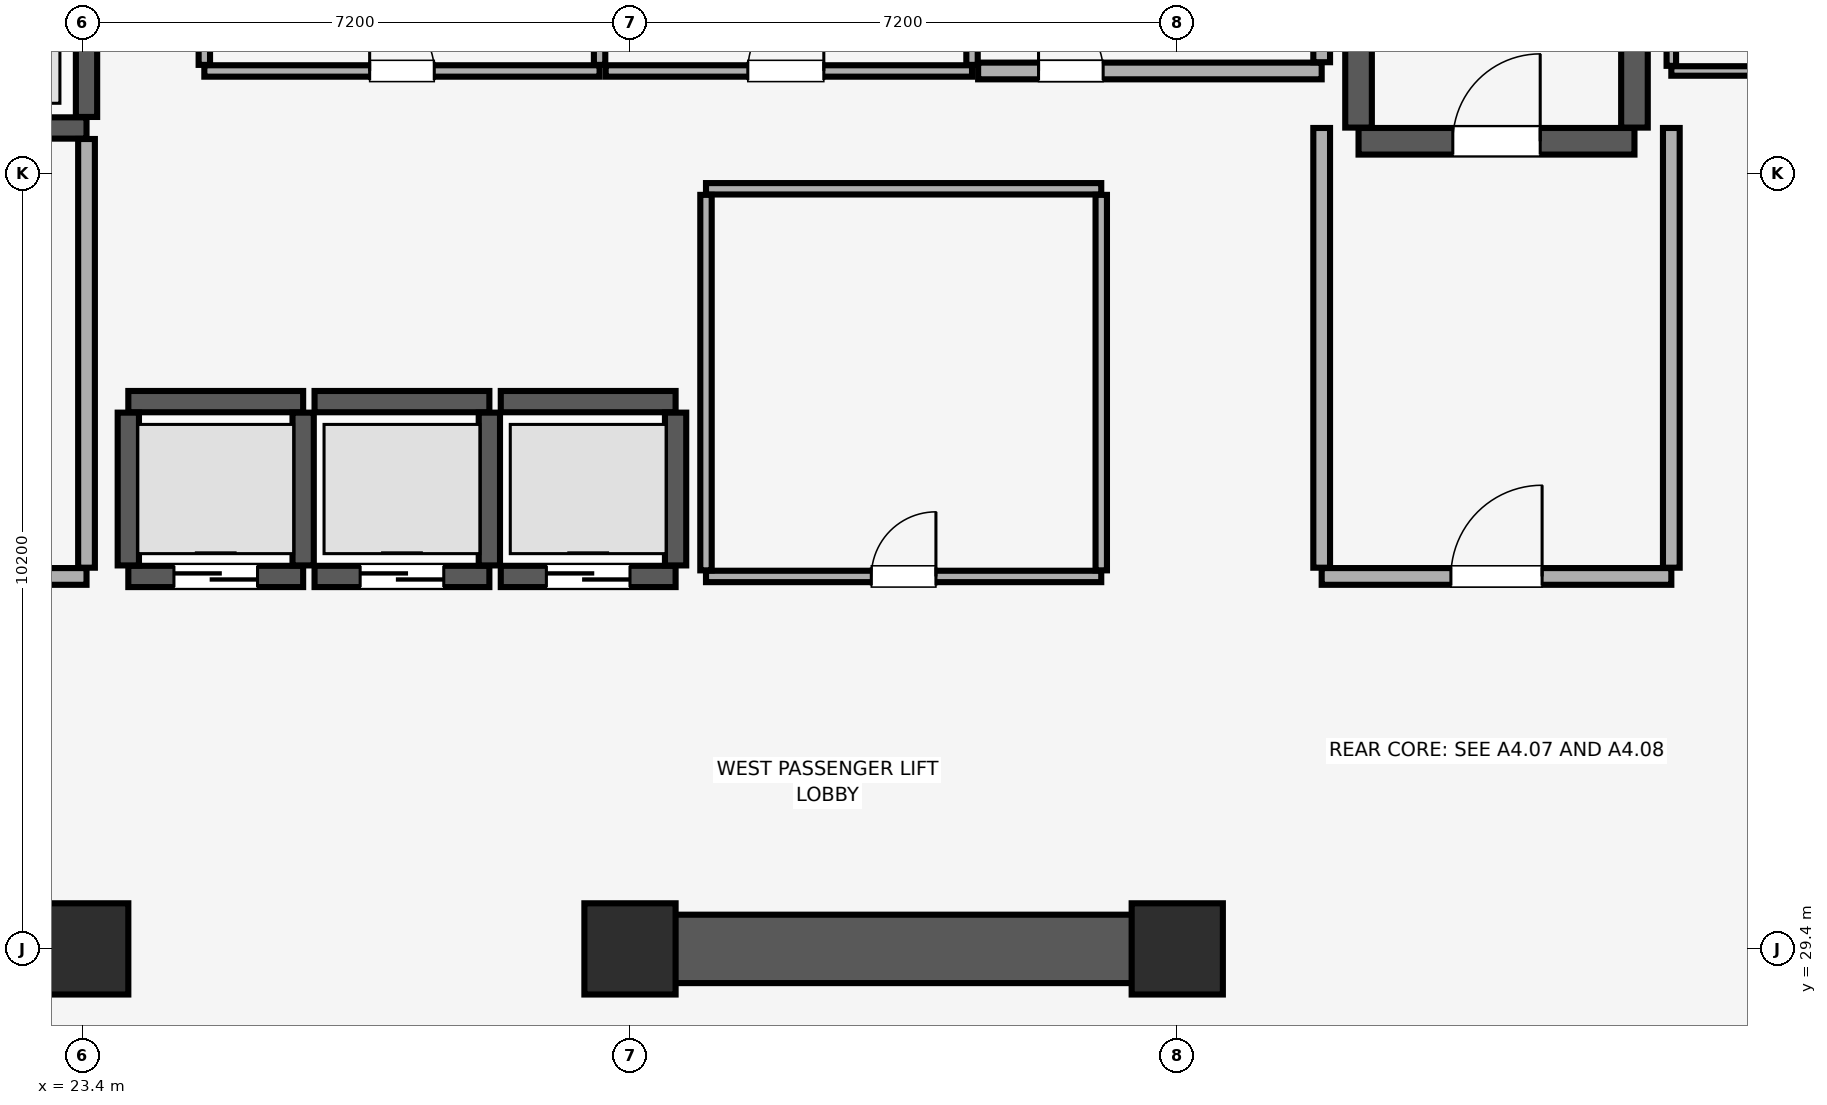
"""IFC4 building model, lengths in metres.
Left out: names, types, materials, properties, quantities, classifications, styles, units other than length and angle.
Written with IfcOpenShell. Run it as: python <this file> out.ifc"""

import sys

from ifc_helpers import new_model, si_unit, direction, frame, frame_2d, origin, origin_2d, place, context, subcontext, project, spatial, rectangle, extrude, element, fill, save


model = new_model("IFC4")
c1 = context("Model", 3, precision=1e-05, world=origin(), true_north=direction((0.0, 1.0)))
c2 = subcontext(c1, "Body", "Model", "MODEL_VIEW")
j1 = project(units=[si_unit("LENGTHUNIT", "METRE"), si_unit("PLANEANGLEUNIT", "RADIAN")], contexts=[c1])
p1 = place(None, origin())
s1 = spatial("IfcSite", under=j1, at=p1, CompositionType="ELEMENT")
p2 = place(p1, origin())
s2 = spatial("IfcBuilding", under=s1, at=p2, CompositionType="ELEMENT")
p3 = place(p2, frame((0.0, 0.0, 130.55)))
s3 = spatial("IfcBuildingStorey", under=s2, at=p3, CompositionType="ELEMENT", Elevation=130.55)
for number, where, z_axis, x_axis in (
    (1, (23.4, 29.4, 0.0), (0.0, 0.0, 1.0), (1.0, 0.0, 0.0)),
    (2, (30.6, 29.4, 0.0), (0.0, 0.0, 1.0), (1.0, 0.0, 0.0)),
    (3, (37.8, 29.4, 0.0), (0.0, 0.0, 1.0), (1.0, 0.0, 0.0)),
):
    element("IfcColumn", number, at=place(p3, frame(where, z_axis=z_axis, x_axis=x_axis)), inside=s3, PredefinedType="COLUMN", context=c2, shape_type="SweptSolid", body=[
        extrude(rectangle(XDim=1.2, YDim=1.2, at=origin_2d()), origin(), (0.0, 0.0, 1.0), 4.56),
    ])
p4 = place(p3, frame((16.655, 29.4, 0.0), z_axis=(0.0, 0.0, 1.0), x_axis=(1.0, 0.0, 0.0)))
e4 = element("IfcWall", 4, at=p4, inside=s3, PredefinedType="SHEAR", context=c2, shape_type="SweptSolid", body=[
    extrude(rectangle(XDim=6.945, YDim=0.9, at=frame_2d((3.473, 0.0))), origin(), (0.0, 0.0, 1.0), 4.52),
])
p5 = place(p3, frame((30.4, 29.4, 0.0), z_axis=(0.0, 0.0, 1.0), x_axis=(1.0, 0.0, 0.0)))
e5 = element("IfcWall", 5, at=p5, inside=s3, PredefinedType="SHEAR", context=c2, shape_type="SweptSolid", body=[
    extrude(rectangle(XDim=7.6, YDim=0.9, at=frame_2d((3.8, 0.0))), origin(), (0.0, 0.0, 1.0), 4.52),
])
p6 = place(p3, frame((40.185, 40.025, 0.0), z_axis=(0.0, 0.0, 1.0), x_axis=(1.0, 0.0, 0.0)))
e6 = element("IfcWall", 6, at=p6, inside=s3, PredefinedType="SHEAR", context=c2, shape_type="SweptSolid", body=[
    extrude(rectangle(XDim=3.63, YDim=0.35, at=frame_2d((1.815, 0.0))), origin(), (0.0, 0.0, 1.0), 4.52),
])
p7 = place(p6, frame((1.24, 0.0, 0.0)))
e7 = element("IfcOpeningElement", 7, at=p7, cuts=e6, PredefinedType="OPENING", context=c2, shape_type="SweptSolid", body=[
    extrude(rectangle(XDim=1.15, YDim=2.15, at=frame_2d((0.575, 1.075))), frame((0.0, 0.185, 0.0), z_axis=(0.0, -1.0, 0.0), x_axis=(1.0, 0.0, 0.0)), (0.0, 0.0, 1.0), 0.37),
])
for number, where, z_axis, x_axis in (
    (8, (40.185, 40.205, 0.0), (0.0, 0.0, 1.0), (0.0, 1.0, 0.0)),
    (9, (43.815, 40.205, 0.0), (0.0, 0.0, 1.0), (0.0, 1.0, 0.0)),
):
    element("IfcWall", number, at=place(p3, frame(where, z_axis=z_axis, x_axis=x_axis)), inside=s3, PredefinedType="SHEAR", context=c2, shape_type="SweptSolid", body=[
        extrude(rectangle(XDim=8.09, YDim=0.35, at=frame_2d((4.045, 0.0))), origin(), (0.0, 0.0, 1.0), 4.52),
    ])
p8 = place(p3, frame((24.0, 34.3, 0.0), z_axis=(0.0, 0.0, 1.0), x_axis=(1.0, 0.0, 0.0)))
e10 = element("IfcWall", 10, at=p8, inside=s3, PredefinedType="SHEAR", context=c2, shape_type="SweptSolid", body=[
    extrude(rectangle(XDim=2.3, YDim=0.28, at=frame_2d((1.15, 0.0))), origin(), (0.0, 0.0, 1.0), 4.52),
])
p9 = place(p8, frame((0.6, 0.0, 0.0)))
e11 = element("IfcOpeningElement", 11, at=p9, cuts=e10, PredefinedType="OPENING", context=c2, shape_type="SweptSolid", body=[
    extrude(rectangle(XDim=1.1, YDim=2.2, at=frame_2d((0.55, 1.1))), frame((0.0, 0.15, 0.0), z_axis=(0.0, -1.0, 0.0), x_axis=(1.0, 0.0, 0.0)), (0.0, 0.0, 1.0), 0.3),
])
p10 = place(p3, frame((24.0, 36.6, 0.0), z_axis=(0.0, 0.0, 1.0), x_axis=(1.0, 0.0, 0.0)))
e12 = element("IfcWall", 12, at=p10, inside=s3, PredefinedType="SHEAR", context=c2, shape_type="SweptSolid", body=[
    extrude(rectangle(XDim=2.3, YDim=0.28, at=frame_2d((1.15, 0.0))), origin(), (0.0, 0.0, 1.0), 4.52),
])
for number, where, z_axis, x_axis in (
    (13, (24.0, 34.445, 0.0), (0.0, 0.0, 1.0), (0.0, 1.0, 0.0)),
    (14, (26.3, 34.445, 0.0), (0.0, 0.0, 1.0), (0.0, 1.0, 0.0)),
):
    element("IfcWall", number, at=place(p3, frame(where, z_axis=z_axis, x_axis=x_axis)), inside=s3, PredefinedType="SHEAR", context=c2, shape_type="SweptSolid", body=[
        extrude(rectangle(XDim=2.01, YDim=0.28, at=frame_2d((1.005, 0.0))), origin(), (0.0, 0.0, 1.0), 4.52),
    ])
p11 = place(p3, frame((26.45, 34.3, 0.0), z_axis=(0.0, 0.0, 1.0), x_axis=(1.0, 0.0, 0.0)))
e15 = element("IfcWall", 15, at=p11, inside=s3, PredefinedType="SHEAR", context=c2, shape_type="SweptSolid", body=[
    extrude(rectangle(XDim=2.3, YDim=0.28, at=frame_2d((1.15, 0.0))), origin(), (0.0, 0.0, 1.0), 4.52),
])
p12 = place(p11, frame((0.6, 0.0, 0.0)))
e16 = element("IfcOpeningElement", 16, at=p12, cuts=e15, PredefinedType="OPENING", context=c2, shape_type="SweptSolid", body=[
    extrude(rectangle(XDim=1.1, YDim=2.2, at=frame_2d((0.55, 1.1))), frame((0.0, 0.15, 0.0), z_axis=(0.0, -1.0, 0.0), x_axis=(1.0, 0.0, 0.0)), (0.0, 0.0, 1.0), 0.3),
])
p13 = place(p3, frame((26.45, 36.6, 0.0), z_axis=(0.0, 0.0, 1.0), x_axis=(1.0, 0.0, 0.0)))
e17 = element("IfcWall", 17, at=p13, inside=s3, PredefinedType="SHEAR", context=c2, shape_type="SweptSolid", body=[
    extrude(rectangle(XDim=2.3, YDim=0.28, at=frame_2d((1.15, 0.0))), origin(), (0.0, 0.0, 1.0), 4.52),
])
p14 = place(p3, frame((28.75, 34.445, 0.0), z_axis=(0.0, 0.0, 1.0), x_axis=(0.0, 1.0, 0.0)))
e18 = element("IfcWall", 18, at=p14, inside=s3, PredefinedType="SHEAR", context=c2, shape_type="SweptSolid", body=[
    extrude(rectangle(XDim=2.01, YDim=0.28, at=frame_2d((1.005, 0.0))), origin(), (0.0, 0.0, 1.0), 4.52),
])
p15 = place(p3, frame((28.9, 34.3, 0.0), z_axis=(0.0, 0.0, 1.0), x_axis=(1.0, 0.0, 0.0)))
e19 = element("IfcWall", 19, at=p15, inside=s3, PredefinedType="SHEAR", context=c2, shape_type="SweptSolid", body=[
    extrude(rectangle(XDim=2.3, YDim=0.28, at=frame_2d((1.15, 0.0))), origin(), (0.0, 0.0, 1.0), 4.52),
])
p16 = place(p15, frame((0.6, 0.0, 0.0)))
e20 = element("IfcOpeningElement", 20, at=p16, cuts=e19, PredefinedType="OPENING", context=c2, shape_type="SweptSolid", body=[
    extrude(rectangle(XDim=1.1, YDim=2.2, at=frame_2d((0.55, 1.1))), frame((0.0, 0.15, 0.0), z_axis=(0.0, -1.0, 0.0), x_axis=(1.0, 0.0, 0.0)), (0.0, 0.0, 1.0), 0.3),
])
p17 = place(p3, frame((28.9, 36.6, 0.0), z_axis=(0.0, 0.0, 1.0), x_axis=(1.0, 0.0, 0.0)))
e21 = element("IfcWall", 21, at=p17, inside=s3, PredefinedType="SHEAR", context=c2, shape_type="SweptSolid", body=[
    extrude(rectangle(XDim=2.3, YDim=0.28, at=frame_2d((1.15, 0.0))), origin(), (0.0, 0.0, 1.0), 4.52),
])
p18 = place(p3, frame((31.2, 34.445, 0.0), z_axis=(0.0, 0.0, 1.0), x_axis=(0.0, 1.0, 0.0)))
e22 = element("IfcWall", 22, at=p18, inside=s3, PredefinedType="SHEAR", context=c2, shape_type="SweptSolid", body=[
    extrude(rectangle(XDim=2.01, YDim=0.28, at=frame_2d((1.005, 0.0))), origin(), (0.0, 0.0, 1.0), 4.52),
])
p19 = place(p3, frame((21.035, 40.2, 0.0), z_axis=(0.0, 0.0, 1.0), x_axis=(1.0, 0.0, 0.0)))
e23 = element("IfcWall", 23, at=p19, inside=s3, PredefinedType="SHEAR", context=c2, shape_type="SweptSolid", body=[
    extrude(rectangle(XDim=2.415, YDim=0.28, at=frame_2d((1.208, 0.0))), origin(), (0.0, 0.0, 1.0), 4.52),
])
p20 = place(p19, frame((0.54, 0.0, 0.0)))
e24 = element("IfcOpeningElement", 24, at=p20, cuts=e23, PredefinedType="OPENING", context=c2, shape_type="SweptSolid", body=[
    extrude(rectangle(XDim=1.3, YDim=2.3, at=frame_2d((0.65, 1.15))), frame((0.0, 0.15, 0.0), z_axis=(0.0, -1.0, 0.0), x_axis=(1.0, 0.0, 0.0)), (0.0, 0.0, 1.0), 0.3),
])
p21 = place(p3, frame((23.45, 40.345, 0.0), z_axis=(0.0, 0.0, 1.0), x_axis=(0.0, 1.0, 0.0)))
e25 = element("IfcWall", 25, at=p21, inside=s3, PredefinedType="SHEAR", context=c2, shape_type="SweptSolid", body=[
    extrude(rectangle(XDim=2.81, YDim=0.28, at=frame_2d((1.405, 0.0))), origin(), (0.0, 0.0, 1.0), 4.52),
])
p22 = place(p3, frame((17.4, 34.3, 0.0), z_axis=(0.0, 0.0, 1.0), x_axis=(1.0, 0.0, 0.0)))
e26 = element("IfcWall", 26, at=p22, inside=s3, PredefinedType="PARTITIONING", context=c2, shape_type="SweptSolid", body=[
    extrude(rectangle(XDim=6.05, YDim=0.22, at=frame_2d((3.025, 0.0))), origin(), (0.0, 0.0, 1.0), 4.52),
])
p23 = place(p22, frame((2.2, 0.0, 0.0)))
e27 = element("IfcOpeningElement", 27, at=p23, cuts=e26, PredefinedType="OPENING", context=c2, shape_type="SweptSolid", body=[
    extrude(rectangle(XDim=1.2, YDim=2.15, at=frame_2d((0.6, 1.075))), frame((0.0, 0.12, 0.0), z_axis=(0.0, -1.0, 0.0), x_axis=(1.0, 0.0, 0.0)), (0.0, 0.0, 1.0), 0.24),
])
p24 = place(p3, frame((23.45, 34.415, 0.0), z_axis=(0.0, 0.0, 1.0), x_axis=(0.0, 1.0, 0.0)))
e28 = element("IfcWall", 28, at=p24, inside=s3, PredefinedType="PARTITIONING", context=c2, shape_type="SweptSolid", body=[
    extrude(rectangle(XDim=5.64, YDim=0.22, at=frame_2d((2.82, 0.0))), origin(), (0.0, 0.0, 1.0), 4.52),
])
p25 = place(p3, frame((39.7, 34.3, 0.0), z_axis=(0.0, 0.0, 1.0), x_axis=(1.0, 0.0, 0.0)))
e29 = element("IfcWall", 29, at=p25, inside=s3, PredefinedType="PARTITIONING", context=c2, shape_type="SweptSolid", body=[
    extrude(rectangle(XDim=4.6, YDim=0.22, at=frame_2d((2.3, 0.0))), origin(), (0.0, 0.0, 1.0), 4.52),
])
p26 = place(p25, frame((1.7, 0.0, 0.0)))
e30 = element("IfcOpeningElement", 30, at=p26, cuts=e29, PredefinedType="OPENING", context=c2, shape_type="SweptSolid", body=[
    extrude(rectangle(XDim=1.2, YDim=2.15, at=frame_2d((0.6, 1.075))), frame((0.0, 0.12, 0.0), z_axis=(0.0, -1.0, 0.0), x_axis=(1.0, 0.0, 0.0)), (0.0, 0.0, 1.0), 0.24),
])
for number, where, z_axis, x_axis in (
    (31, (39.7, 34.415, 0.0), (0.0, 0.0, 1.0), (0.0, 1.0, 0.0)),
    (32, (44.3, 34.415, 0.0), (0.0, 0.0, 1.0), (0.0, 1.0, 0.0)),
):
    element("IfcWall", number, at=place(p3, frame(where, z_axis=z_axis, x_axis=x_axis)), inside=s3, PredefinedType="PARTITIONING", context=c2, shape_type="SweptSolid", body=[
        extrude(rectangle(XDim=5.785, YDim=0.22, at=frame_2d((2.893, 0.0))), origin(), (0.0, 0.0, 1.0), 4.52),
    ])
p27 = place(p3, frame((31.6, 34.3, 0.0), z_axis=(0.0, 0.0, 1.0), x_axis=(1.0, 0.0, 0.0)))
e33 = element("IfcWall", 33, at=p27, inside=s3, PredefinedType="PARTITIONING", context=c2, shape_type="SweptSolid", body=[
    extrude(rectangle(XDim=5.2, YDim=0.15, at=frame_2d((2.6, 0.0))), origin(), (0.0, 0.0, 1.0), 4.52),
])
p28 = place(p27, frame((2.175, 0.0, 0.0)))
e34 = element("IfcOpeningElement", 34, at=p28, cuts=e33, PredefinedType="OPENING", context=c2, shape_type="SweptSolid", body=[
    extrude(rectangle(XDim=0.85, YDim=2.1, at=frame_2d((0.425, 1.05))), frame((0.0, 0.085, 0.0), z_axis=(0.0, -1.0, 0.0), x_axis=(1.0, 0.0, 0.0)), (0.0, 0.0, 1.0), 0.17),
])
p29 = place(p3, frame((31.6, 39.4, 0.0), z_axis=(0.0, 0.0, 1.0), x_axis=(1.0, 0.0, 0.0)))
e35 = element("IfcWall", 35, at=p29, inside=s3, PredefinedType="PARTITIONING", context=c2, shape_type="SweptSolid", body=[
    extrude(rectangle(XDim=5.2, YDim=0.15, at=frame_2d((2.6, 0.0))), origin(), (0.0, 0.0, 1.0), 4.52),
])
for number, where, z_axis, x_axis in (
    (36, (31.6, 34.38, 0.0), (0.0, 0.0, 1.0), (0.0, 1.0, 0.0)),
    (37, (36.8, 34.38, 0.0), (0.0, 0.0, 1.0), (0.0, 1.0, 0.0)),
):
    element("IfcWall", number, at=place(p3, frame(where, z_axis=z_axis, x_axis=x_axis)), inside=s3, PredefinedType="PARTITIONING", context=c2, shape_type="SweptSolid", body=[
        extrude(rectangle(XDim=4.94, YDim=0.15, at=frame_2d((2.47, 0.0))), origin(), (0.0, 0.0, 1.0), 4.52),
    ])
p30 = place(p3, frame((25.0, 40.95, 0.0), z_axis=(0.0, 0.0, 1.0), x_axis=(1.0, 0.0, 0.0)))
e38 = element("IfcWall", 38, at=p30, inside=s3, PredefinedType="PARTITIONING", context=c2, shape_type="SweptSolid", body=[
    extrude(rectangle(XDim=5.2, YDim=0.15, at=frame_2d((2.6, 0.0))), origin(), (0.0, 0.0, 1.0), 4.52),
])
p31 = place(p30, frame((2.175, 0.0, 0.0)))
e39 = element("IfcOpeningElement", 39, at=p31, cuts=e38, PredefinedType="OPENING", context=c2, shape_type="SweptSolid", body=[
    extrude(rectangle(XDim=0.85, YDim=2.1, at=frame_2d((0.425, 1.05))), frame((0.0, 0.085, 0.0), z_axis=(0.0, -1.0, 0.0), x_axis=(1.0, 0.0, 0.0)), (0.0, 0.0, 1.0), 0.17),
])
for number, where, z_axis, x_axis in (
    (40, (25.0, 41.03, 0.0), (0.0, 0.0, 1.0), (0.0, 1.0, 0.0)),
    (41, (30.2, 41.03, 0.0), (0.0, 0.0, 1.0), (0.0, 1.0, 0.0)),
):
    element("IfcWall", number, at=place(p3, frame(where, z_axis=z_axis, x_axis=x_axis)), inside=s3, PredefinedType="PARTITIONING", context=c2, shape_type="SweptSolid", body=[
        extrude(rectangle(XDim=7.82, YDim=0.15, at=frame_2d((3.91, 0.0))), origin(), (0.0, 0.0, 1.0), 4.52),
    ])
p32 = place(p3, frame((30.28, 40.95, 0.0), z_axis=(0.0, 0.0, 1.0), x_axis=(1.0, 0.0, 0.0)))
e42 = element("IfcWall", 42, at=p32, inside=s3, PredefinedType="PARTITIONING", context=c2, shape_type="SweptSolid", body=[
    extrude(rectangle(XDim=4.82, YDim=0.15, at=frame_2d((2.41, 0.0))), origin(), (0.0, 0.0, 1.0), 4.52),
])
p33 = place(p32, frame((1.87, 0.0, 0.0)))
e43 = element("IfcOpeningElement", 43, at=p33, cuts=e42, PredefinedType="OPENING", context=c2, shape_type="SweptSolid", body=[
    extrude(rectangle(XDim=1.0, YDim=2.15, at=frame_2d((0.5, 1.075))), frame((0.0, 0.085, 0.0), z_axis=(0.0, -1.0, 0.0), x_axis=(1.0, 0.0, 0.0)), (0.0, 0.0, 1.0), 0.17),
])
p34 = place(p3, frame((35.1, 41.03, 0.0), z_axis=(0.0, 0.0, 1.0), x_axis=(0.0, 1.0, 0.0)))
e44 = element("IfcWall", 44, at=p34, inside=s3, PredefinedType="PARTITIONING", context=c2, shape_type="SweptSolid", body=[
    extrude(rectangle(XDim=7.82, YDim=0.15, at=frame_2d((3.91, 0.0))), origin(), (0.0, 0.0, 1.0), 4.52),
])
p35 = place(p3, frame((35.18, 40.95, 0.0), z_axis=(0.0, 0.0, 1.0), x_axis=(1.0, 0.0, 0.0)))
e45 = element("IfcWall", 45, at=p35, inside=s3, PredefinedType="PARTITIONING", context=c2, shape_type="SweptSolid", body=[
    extrude(rectangle(XDim=4.52, YDim=0.22, at=frame_2d((2.26, 0.0))), origin(), (0.0, 0.0, 1.0), 4.52),
])
p36 = place(p35, frame((0.795, 0.0, 0.0)))
e46 = element("IfcOpeningElement", 46, at=p36, cuts=e45, PredefinedType="OPENING", context=c2, shape_type="SweptSolid", body=[
    extrude(rectangle(XDim=0.85, YDim=2.1, at=frame_2d((0.425, 1.05))), frame((0.0, 0.12, 0.0), z_axis=(0.0, -1.0, 0.0), x_axis=(1.0, 0.0, 0.0)), (0.0, 0.0, 1.0), 0.24),
])
p37 = place(p3, frame((39.7, 41.065, 0.0), z_axis=(0.0, 0.0, 1.0), x_axis=(0.0, 1.0, 0.0)))
e47 = element("IfcWall", 47, at=p37, inside=s3, PredefinedType="PARTITIONING", context=c2, shape_type="SweptSolid", body=[
    extrude(rectangle(XDim=7.785, YDim=0.22, at=frame_2d((3.893, 0.0))), origin(), (0.0, 0.0, 1.0), 4.52),
])
p38 = place(p3, frame((44.3, 40.95, 0.0), z_axis=(0.0, 0.0, 1.0), x_axis=(1.0, 0.0, 0.0)))
e48 = element("IfcWall", 48, at=p38, inside=s3, PredefinedType="PARTITIONING", context=c2, shape_type="SweptSolid", body=[
    extrude(rectangle(XDim=3.1, YDim=0.125, at=frame_2d((1.55, 0.0))), origin(), (0.0, 0.0, 1.0), 4.52),
])
p39 = place(p38, frame((1.1, 0.0, 0.0)))
e49 = element("IfcOpeningElement", 49, at=p39, cuts=e48, PredefinedType="OPENING", context=c2, shape_type="SweptSolid", body=[
    extrude(rectangle(XDim=0.9, YDim=2.1, at=frame_2d((0.45, 1.05))), frame((0.0, 0.073, 0.0), z_axis=(0.0, -1.0, 0.0), x_axis=(1.0, 0.0, 0.0)), (0.0, 0.0, 1.0), 0.145),
])
p40 = place(p3, frame((44.3, 41.018, 0.0), z_axis=(0.0, 0.0, 1.0), x_axis=(0.0, 1.0, 0.0)))
e50 = element("IfcWall", 50, at=p40, inside=s3, PredefinedType="PARTITIONING", context=c2, shape_type="SweptSolid", body=[
    extrude(rectangle(XDim=7.833, YDim=0.125, at=frame_2d((3.916, 0.0))), origin(), (0.0, 0.0, 1.0), 4.52),
])
p41 = place(p7, origin())
e51 = element("IfcDoor", 51, at=p41, inside=s3, OperationType="SINGLE_SWING_RIGHT", PredefinedType="DOOR", context=c2, shape_type="SweptSolid", body=[
    extrude(rectangle(XDim=1.15, YDim=2.15, at=frame_2d((0.575, 1.075))), frame((0.0, 0.025, 0.0), z_axis=(0.0, -1.0, 0.0), x_axis=(1.0, 0.0, 0.0)), (0.0, 0.0, 1.0), 0.05),
])
fill(e7, e51)
p42 = place(p9, origin())
e52 = element("IfcDoor", 52, at=p42, inside=s3, OperationType="DOUBLE_DOOR_SLIDING", PredefinedType="DOOR", context=c2, shape_type="SweptSolid", body=[
    extrude(rectangle(XDim=1.1, YDim=2.2, at=frame_2d((0.55, 1.1))), frame((0.0, 0.025, 0.0), z_axis=(0.0, -1.0, 0.0), x_axis=(1.0, 0.0, 0.0)), (0.0, 0.0, 1.0), 0.05),
])
fill(e11, e52)
p43 = place(p12, origin())
e53 = element("IfcDoor", 53, at=p43, inside=s3, OperationType="DOUBLE_DOOR_SLIDING", PredefinedType="DOOR", context=c2, shape_type="SweptSolid", body=[
    extrude(rectangle(XDim=1.1, YDim=2.2, at=frame_2d((0.55, 1.1))), frame((0.0, 0.025, 0.0), z_axis=(0.0, -1.0, 0.0), x_axis=(1.0, 0.0, 0.0)), (0.0, 0.0, 1.0), 0.05),
])
fill(e16, e53)
p44 = place(p16, origin())
e54 = element("IfcDoor", 54, at=p44, inside=s3, OperationType="DOUBLE_DOOR_SLIDING", PredefinedType="DOOR", context=c2, shape_type="SweptSolid", body=[
    extrude(rectangle(XDim=1.1, YDim=2.2, at=frame_2d((0.55, 1.1))), frame((0.0, 0.025, 0.0), z_axis=(0.0, -1.0, 0.0), x_axis=(1.0, 0.0, 0.0)), (0.0, 0.0, 1.0), 0.05),
])
fill(e20, e54)
p45 = place(p26, origin())
e55 = element("IfcDoor", 55, at=p45, inside=s3, OperationType="SINGLE_SWING_RIGHT", PredefinedType="DOOR", context=c2, shape_type="SweptSolid", body=[
    extrude(rectangle(XDim=1.2, YDim=2.15, at=frame_2d((0.6, 1.075))), frame((0.0, 0.025, 0.0), z_axis=(0.0, -1.0, 0.0), x_axis=(1.0, 0.0, 0.0)), (0.0, 0.0, 1.0), 0.05),
])
fill(e30, e55)
p46 = place(p28, origin())
e56 = element("IfcDoor", 56, at=p46, inside=s3, OperationType="SINGLE_SWING_RIGHT", PredefinedType="DOOR", context=c2, shape_type="SweptSolid", body=[
    extrude(rectangle(XDim=0.85, YDim=2.1, at=frame_2d((0.425, 1.05))), frame((0.0, 0.025, 0.0), z_axis=(0.0, -1.0, 0.0), x_axis=(1.0, 0.0, 0.0)), (0.0, 0.0, 1.0), 0.05),
])
fill(e34, e56)
p47 = place(p31, origin())
e57 = element("IfcDoor", 57, at=p47, inside=s3, OperationType="SINGLE_SWING_LEFT", PredefinedType="DOOR", context=c2, shape_type="SweptSolid", body=[
    extrude(rectangle(XDim=0.85, YDim=2.1, at=frame_2d((0.425, 1.05))), frame((0.0, 0.025, 0.0), z_axis=(0.0, -1.0, 0.0), x_axis=(1.0, 0.0, 0.0)), (0.0, 0.0, 1.0), 0.05),
])
fill(e39, e57)
p48 = place(p33, origin())
e58 = element("IfcDoor", 58, at=p48, inside=s3, OperationType="SINGLE_SWING_RIGHT", PredefinedType="DOOR", context=c2, shape_type="SweptSolid", body=[
    extrude(rectangle(XDim=1.0, YDim=2.15, at=frame_2d((0.5, 1.075))), frame((0.0, 0.025, 0.0), z_axis=(0.0, -1.0, 0.0), x_axis=(1.0, 0.0, 0.0)), (0.0, 0.0, 1.0), 0.05),
])
fill(e43, e58)
p49 = place(p36, origin())
e59 = element("IfcDoor", 59, at=p49, inside=s3, OperationType="SINGLE_SWING_LEFT", PredefinedType="DOOR", context=c2, shape_type="SweptSolid", body=[
    extrude(rectangle(XDim=0.85, YDim=2.1, at=frame_2d((0.425, 1.05))), frame((0.0, 0.025, 0.0), z_axis=(0.0, -1.0, 0.0), x_axis=(1.0, 0.0, 0.0)), (0.0, 0.0, 1.0), 0.05),
])
fill(e46, e59)
save(model, sys.argv[1])
